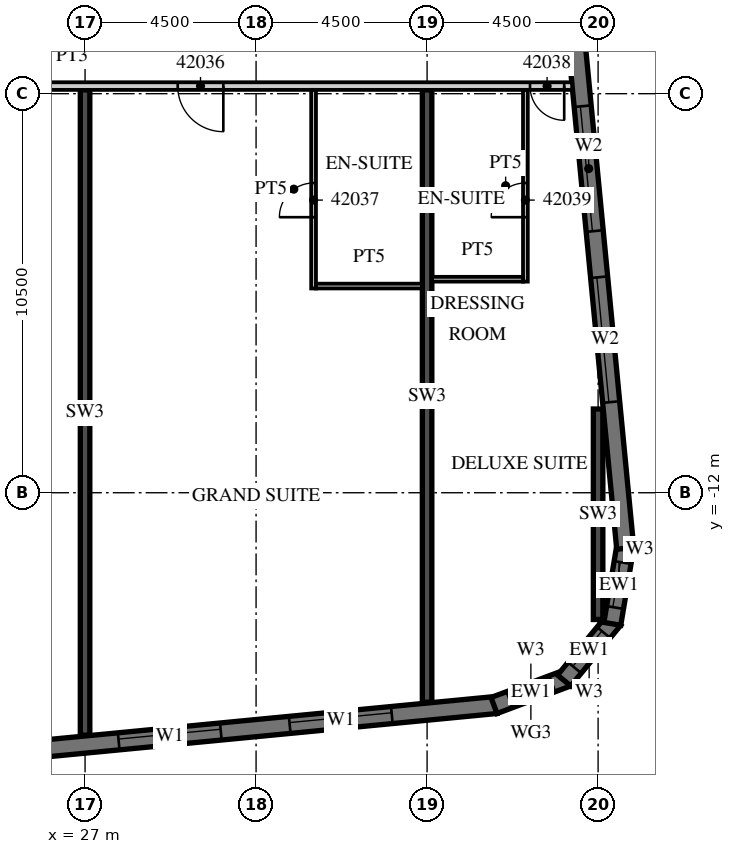
"""IFC4 building model, lengths in metres.
Left out: names, types, materials, properties, quantities, classifications, styles, units other than length and angle.
Written with IfcOpenShell. Run it as: python <this file> out.ifc"""

import sys

from ifc_helpers import new_model, si_unit, direction, frame, frame_2d, origin, place, context, subcontext, project, spatial, polyline, rectangle, outline, extrude, element, fill, save


model = new_model("IFC4")
c1 = context("Model", 3, precision=1e-05, world=origin(), true_north=direction((0.0, 1.0)))
c2 = subcontext(c1, "Body", "Model", "MODEL_VIEW")
j1 = project(units=[si_unit("LENGTHUNIT", "METRE"), si_unit("PLANEANGLEUNIT", "RADIAN")], contexts=[c1])
p1 = place(None, origin())
s1 = spatial("IfcSite", under=j1, at=p1, CompositionType="ELEMENT")
p2 = place(p1, origin())
s2 = spatial("IfcBuilding", under=s1, at=p2, CompositionType="ELEMENT")
p3 = place(p2, frame((0.0, 0.0, 180.1)))
s3 = spatial("IfcBuildingStorey", under=s2, at=p3, CompositionType="ELEMENT", Elevation=180.1)
p4 = place(p3, frame((27.0, -18.379, 0.0), z_axis=(0.0, 0.0, 1.0), x_axis=(0.0, 1.0, 0.0)))
e1 = element("IfcWall", 1, at=p4, inside=s3, PredefinedType="SHEAR", context=c2, shape_type="SweptSolid", body=[
    extrude(rectangle(XDim=16.979, YDim=0.25, at=frame_2d((8.489, 0.0))), origin(), (0.0, 0.0, 1.0), 3.3),
])
p5 = place(p3, frame((36.0, -17.512, 0.0), z_axis=(0.0, 0.0, 1.0), x_axis=(0.0, 1.0, 0.0)))
e2 = element("IfcWall", 2, at=p5, inside=s3, PredefinedType="SHEAR", context=c2, shape_type="SweptSolid", body=[
    extrude(rectangle(XDim=16.112, YDim=0.25, at=frame_2d((8.056, 0.0))), origin(), (0.0, 0.0, 1.0), 3.3),
])
p6 = place(p3, frame((40.5, -15.335, 0.0), z_axis=(0.0, 0.0, 1.0), x_axis=(0.0, 1.0, 0.0)))
e3 = element("IfcWall", 3, at=p6, inside=s3, PredefinedType="SHEAR", context=c2, shape_type="SweptSolid", body=[
    extrude(rectangle(XDim=5.538, YDim=0.25, at=frame_2d((2.769, 0.0))), origin(), (0.0, 0.0, 1.0), 3.3),
])
p7 = place(p3, frame((-13.521, -22.529, 0.0), z_axis=(0.0, 0.0, 1.0), x_axis=(0.995396436651, 0.095843277819, 0.0)))
e4 = element("IfcWall", 4, at=p7, inside=s3, PredefinedType="SOLIDWALL", context=c2, shape_type="SweptSolid", body=[
    extrude(rectangle(XDim=51.578, YDim=0.45, at=frame_2d((25.789, 0.0))), origin(), (0.0, 0.0, 1.0), 3.02),
])
p8 = place(p7, frame((0.91, 0.0, 0.45)))
e5 = element("IfcOpeningElement", 5, at=p8, cuts=e4, PredefinedType="OPENING", context=c2, shape_type="SweptSolid", body=[
    extrude(rectangle(XDim=2.7, YDim=2.25, at=frame_2d((1.35, 1.125))), frame((0.0, 0.235, 0.0), z_axis=(0.0, -1.0, 0.0), x_axis=(1.0, 0.0, 0.0)), (0.0, 0.0, 1.0), 0.47),
])
p9 = place(p7, frame((5.431, 0.0, 0.45)))
e6 = element("IfcOpeningElement", 6, at=p9, cuts=e4, PredefinedType="OPENING", context=c2, shape_type="SweptSolid", body=[
    extrude(rectangle(XDim=2.7, YDim=2.25, at=frame_2d((1.35, 1.125))), frame((0.0, 0.235, 0.0), z_axis=(0.0, -1.0, 0.0), x_axis=(1.0, 0.0, 0.0)), (0.0, 0.0, 1.0), 0.47),
])
p10 = place(p7, frame((9.952, 0.0, 0.45)))
e7 = element("IfcOpeningElement", 7, at=p10, cuts=e4, PredefinedType="OPENING", context=c2, shape_type="SweptSolid", body=[
    extrude(rectangle(XDim=2.7, YDim=2.25, at=frame_2d((1.35, 1.125))), frame((0.0, 0.235, 0.0), z_axis=(0.0, -1.0, 0.0), x_axis=(1.0, 0.0, 0.0)), (0.0, 0.0, 1.0), 0.47),
])
p11 = place(p7, frame((14.473, 0.0, 0.45)))
e8 = element("IfcOpeningElement", 8, at=p11, cuts=e4, PredefinedType="OPENING", context=c2, shape_type="SweptSolid", body=[
    extrude(rectangle(XDim=2.7, YDim=2.25, at=frame_2d((1.35, 1.125))), frame((0.0, 0.235, 0.0), z_axis=(0.0, -1.0, 0.0), x_axis=(1.0, 0.0, 0.0)), (0.0, 0.0, 1.0), 0.47),
])
p12 = place(p7, frame((18.994, 0.0, 0.45)))
e9 = element("IfcOpeningElement", 9, at=p12, cuts=e4, PredefinedType="OPENING", context=c2, shape_type="SweptSolid", body=[
    extrude(rectangle(XDim=2.7, YDim=2.25, at=frame_2d((1.35, 1.125))), frame((0.0, 0.235, 0.0), z_axis=(0.0, -1.0, 0.0), x_axis=(1.0, 0.0, 0.0)), (0.0, 0.0, 1.0), 0.47),
])
p13 = place(p7, frame((23.514, 0.0, 0.45)))
e10 = element("IfcOpeningElement", 10, at=p13, cuts=e4, PredefinedType="OPENING", context=c2, shape_type="SweptSolid", body=[
    extrude(rectangle(XDim=2.7, YDim=2.25, at=frame_2d((1.35, 1.125))), frame((0.0, 0.235, 0.0), z_axis=(0.0, -1.0, 0.0), x_axis=(1.0, 0.0, 0.0)), (0.0, 0.0, 1.0), 0.47),
])
p14 = place(p7, frame((28.035, 0.0, 0.45)))
e11 = element("IfcOpeningElement", 11, at=p14, cuts=e4, PredefinedType="OPENING", context=c2, shape_type="SweptSolid", body=[
    extrude(rectangle(XDim=2.7, YDim=2.25, at=frame_2d((1.35, 1.125))), frame((0.0, 0.235, 0.0), z_axis=(0.0, -1.0, 0.0), x_axis=(1.0, 0.0, 0.0)), (0.0, 0.0, 1.0), 0.47),
])
p15 = place(p7, frame((32.556, 0.0, 0.45)))
e12 = element("IfcOpeningElement", 12, at=p15, cuts=e4, PredefinedType="OPENING", context=c2, shape_type="SweptSolid", body=[
    extrude(rectangle(XDim=2.7, YDim=2.25, at=frame_2d((1.35, 1.125))), frame((0.0, 0.235, 0.0), z_axis=(0.0, -1.0, 0.0), x_axis=(1.0, 0.0, 0.0)), (0.0, 0.0, 1.0), 0.47),
])
p16 = place(p7, frame((37.077, 0.0, 0.45)))
e13 = element("IfcOpeningElement", 13, at=p16, cuts=e4, PredefinedType="OPENING", context=c2, shape_type="SweptSolid", body=[
    extrude(rectangle(XDim=2.7, YDim=2.25, at=frame_2d((1.35, 1.125))), frame((0.0, 0.235, 0.0), z_axis=(0.0, -1.0, 0.0), x_axis=(1.0, 0.0, 0.0)), (0.0, 0.0, 1.0), 0.47),
])
p17 = place(p7, frame((41.598, 0.0, 0.45)))
e14 = element("IfcOpeningElement", 14, at=p17, cuts=e4, PredefinedType="OPENING", context=c2, shape_type="SweptSolid", body=[
    extrude(rectangle(XDim=2.7, YDim=2.25, at=frame_2d((1.35, 1.125))), frame((0.0, 0.235, 0.0), z_axis=(0.0, -1.0, 0.0), x_axis=(1.0, 0.0, 0.0)), (0.0, 0.0, 1.0), 0.47),
])
p18 = place(p7, frame((46.119, 0.0, 0.45)))
e15 = element("IfcOpeningElement", 15, at=p18, cuts=e4, PredefinedType="OPENING", context=c2, shape_type="SweptSolid", body=[
    extrude(rectangle(XDim=2.7, YDim=2.25, at=frame_2d((1.35, 1.125))), frame((0.0, 0.235, 0.0), z_axis=(0.0, -1.0, 0.0), x_axis=(1.0, 0.0, 0.0)), (0.0, 0.0, 1.0), 0.47),
])
p19 = place(p3, frame((37.761, -17.598, 0.0), z_axis=(0.0, 0.0, 1.0), x_axis=(0.936677599948, 0.350192909346, 0.0)))
e16 = element("IfcWall", 16, at=p19, inside=s3, PredefinedType="SOLIDWALL", context=c2, shape_type="SweptSolid", body=[
    extrude(outline(polyline([(0.0, -0.225), (2.071, -0.225), (1.95, 0.225), (0.121, 0.225), (0.0, -0.225)])), origin(), (0.0, 0.0, 1.0), 3.02),
])
p20 = place(p19, frame((0.435, 0.0, 0.45)))
e17 = element("IfcOpeningElement", 17, at=p20, cuts=e16, PredefinedType="OPENING", context=c2, shape_type="SweptSolid", body=[
    extrude(rectangle(XDim=1.2, YDim=2.25, at=frame_2d((0.6, 1.125))), frame((0.0, 0.235, 0.0), z_axis=(0.0, -1.0, 0.0), x_axis=(1.0, 0.0, 0.0)), (0.0, 0.0, 1.0), 0.47),
])
p21 = place(p3, frame((39.606, -16.941, 0.0), z_axis=(0.0, 0.0, 1.0), x_axis=(0.636116318187, 0.771593176315, 0.0)))
e18 = element("IfcWall", 18, at=p21, inside=s3, PredefinedType="SOLIDWALL", context=c2, shape_type="SweptSolid", body=[
    extrude(outline(polyline([(0.0, -0.225), (2.071, -0.225), (1.95, 0.225), (0.121, 0.225), (0.0, -0.225)])), origin(), (0.0, 0.0, 1.0), 3.02),
])
p22 = place(p21, frame((0.435, 0.0, 0.45)))
e19 = element("IfcOpeningElement", 19, at=p22, cuts=e18, PredefinedType="OPENING", context=c2, shape_type="SweptSolid", body=[
    extrude(rectangle(XDim=1.2, YDim=2.25, at=frame_2d((0.6, 1.125))), frame((0.0, 0.235, 0.0), z_axis=(0.0, -1.0, 0.0), x_axis=(1.0, 0.0, 0.0)), (0.0, 0.0, 1.0), 0.47),
])
p23 = place(p3, frame((40.875, -15.449, 0.0), z_axis=(0.0, 0.0, 1.0), x_axis=(0.164953448126, 0.986301353518, 0.0)))
e20 = element("IfcWall", 20, at=p23, inside=s3, PredefinedType="SOLIDWALL", context=c2, shape_type="SweptSolid", body=[
    extrude(outline(polyline([(0.0, -0.225), (2.071, -0.225), (1.95, 0.225), (0.121, 0.225), (0.0, -0.225)])), origin(), (0.0, 0.0, 1.0), 3.02),
])
p24 = place(p23, frame((0.435, 0.0, 0.45)))
e21 = element("IfcOpeningElement", 21, at=p24, cuts=e20, PredefinedType="OPENING", context=c2, shape_type="SweptSolid", body=[
    extrude(rectangle(XDim=1.2, YDim=2.25, at=frame_2d((0.6, 1.125))), frame((0.0, 0.235, 0.0), z_axis=(0.0, -1.0, 0.0), x_axis=(1.0, 0.0, 0.0)), (0.0, 0.0, 1.0), 0.47),
])
p25 = place(p3, frame((41.214, -13.466, 0.0), z_axis=(0.0, 0.0, 1.0), x_axis=(-0.095847314626, 0.995396047952, 0.0)))
e22 = element("IfcWall", 22, at=p25, inside=s3, PredefinedType="SOLIDWALL", context=c2, shape_type="SweptSolid", body=[
    extrude(rectangle(XDim=34.0, YDim=0.45, at=frame_2d((17.0, 0.0))), origin(), (0.0, 0.0, 1.0), 3.02),
])
p26 = place(p25, frame((3.869, 0.0, 0.45)))
e23 = element("IfcOpeningElement", 23, at=p26, cuts=e22, PredefinedType="OPENING", context=c2, shape_type="SweptSolid", body=[
    extrude(rectangle(XDim=3.3, YDim=2.25, at=frame_2d((1.65, 1.125))), frame((0.0, 0.235, 0.0), z_axis=(0.0, -1.0, 0.0), x_axis=(1.0, 0.0, 0.0)), (0.0, 0.0, 1.0), 0.47),
])
p27 = place(p25, frame((8.39, 0.0, 0.45)))
e24 = element("IfcOpeningElement", 24, at=p27, cuts=e22, PredefinedType="OPENING", context=c2, shape_type="SweptSolid", body=[
    extrude(rectangle(XDim=3.3, YDim=2.25, at=frame_2d((1.65, 1.125))), frame((0.0, 0.235, 0.0), z_axis=(0.0, -1.0, 0.0), x_axis=(1.0, 0.0, 0.0)), (0.0, 0.0, 1.0), 0.47),
])
p28 = place(p3, frame((13.5, -1.3, 0.0), z_axis=(0.0, 0.0, 1.0), x_axis=(1.0, 0.0, 0.0)))
e25 = element("IfcWall", 25, at=p28, inside=s3, PredefinedType="PARTITIONING", context=c2, shape_type="SweptSolid", body=[
    extrude(rectangle(XDim=26.317, YDim=0.2, at=frame_2d((13.158, 0.0))), origin(), (0.0, 0.0, 1.0), 3.02),
])
p29 = place(p28, frame((2.925, 0.0, 0.0)))
e26 = element("IfcOpeningElement", 26, at=p29, cuts=e25, PredefinedType="OPENING", context=c2, shape_type="SweptSolid", body=[
    extrude(rectangle(XDim=1.0, YDim=2.1, at=frame_2d((0.5, 1.05))), frame((0.0, 0.11, 0.0), z_axis=(0.0, -1.0, 0.0), x_axis=(1.0, 0.0, 0.0)), (0.0, 0.0, 1.0), 0.22),
])
p30 = place(p28, frame((9.862, 0.0, 0.0)))
e27 = element("IfcOpeningElement", 27, at=p30, cuts=e25, PredefinedType="OPENING", context=c2, shape_type="SweptSolid", body=[
    extrude(rectangle(XDim=1.2, YDim=2.1, at=frame_2d((0.6, 1.05))), frame((0.0, 0.11, 0.0), z_axis=(0.0, -1.0, 0.0), x_axis=(1.0, 0.0, 0.0)), (0.0, 0.0, 1.0), 0.22),
])
p31 = place(p28, frame((15.938, 0.0, 0.0)))
e28 = element("IfcOpeningElement", 28, at=p31, cuts=e25, PredefinedType="OPENING", context=c2, shape_type="SweptSolid", body=[
    extrude(rectangle(XDim=1.2, YDim=2.1, at=frame_2d((0.6, 1.05))), frame((0.0, 0.11, 0.0), z_axis=(0.0, -1.0, 0.0), x_axis=(1.0, 0.0, 0.0)), (0.0, 0.0, 1.0), 0.22),
])
p32 = place(p28, frame((25.208, 0.0, 0.0)))
e29 = element("IfcOpeningElement", 29, at=p32, cuts=e25, PredefinedType="OPENING", context=c2, shape_type="SweptSolid", body=[
    extrude(rectangle(XDim=0.9, YDim=2.1, at=frame_2d((0.45, 1.05))), frame((0.0, 0.11, 0.0), z_axis=(0.0, -1.0, 0.0), x_axis=(1.0, 0.0, 0.0)), (0.0, 0.0, 1.0), 0.22),
])
p33 = place(p3, frame((33.013, -6.625, 0.0), z_axis=(0.0, 0.0, 1.0), x_axis=(0.0, 1.0, 0.0)))
e30 = element("IfcWall", 30, at=p33, inside=s3, PredefinedType="PARTITIONING", context=c2, shape_type="SweptSolid", body=[
    extrude(rectangle(XDim=5.225, YDim=0.125, at=frame_2d((2.613, 0.0))), origin(), (0.0, 0.0, 1.0), 3.02),
])
p34 = place(p33, frame((1.875, 0.0, 0.0)))
e31 = element("IfcOpeningElement", 31, at=p34, cuts=e30, PredefinedType="OPENING", context=c2, shape_type="SweptSolid", body=[
    extrude(rectangle(XDim=0.9, YDim=2.1, at=frame_2d((0.45, 1.05))), frame((0.0, 0.073, 0.0), z_axis=(0.0, -1.0, 0.0), x_axis=(1.0, 0.0, 0.0)), (0.0, 0.0, 1.0), 0.145),
])
p35 = place(p3, frame((33.075, -6.562, 0.0), z_axis=(0.0, 0.0, 1.0), x_axis=(1.0, 0.0, 0.0)))
e32 = element("IfcWall", 32, at=p35, inside=s3, PredefinedType="PARTITIONING", context=c2, shape_type="SweptSolid", body=[
    extrude(rectangle(XDim=2.8, YDim=0.125, at=frame_2d((1.4, 0.0))), origin(), (0.0, 0.0, 1.0), 3.02),
])
p36 = place(p3, frame((38.587, -6.445, 0.0), z_axis=(0.0, 0.0, 1.0), x_axis=(0.0, 1.0, 0.0)))
e33 = element("IfcWall", 33, at=p36, inside=s3, PredefinedType="PARTITIONING", context=c2, shape_type="SweptSolid", body=[
    extrude(rectangle(XDim=5.045, YDim=0.125, at=frame_2d((2.522, 0.0))), origin(), (0.0, 0.0, 1.0), 3.02),
])
p37 = place(p36, frame((1.695, 0.0, 0.0)))
e34 = element("IfcOpeningElement", 34, at=p37, cuts=e33, PredefinedType="OPENING", context=c2, shape_type="SweptSolid", body=[
    extrude(rectangle(XDim=0.9, YDim=2.1, at=frame_2d((0.45, 1.05))), frame((0.0, 0.073, 0.0), z_axis=(0.0, -1.0, 0.0), x_axis=(1.0, 0.0, 0.0)), (0.0, 0.0, 1.0), 0.145),
])
p38 = place(p3, frame((36.125, -6.382, 0.0), z_axis=(0.0, 0.0, 1.0), x_axis=(1.0, 0.0, 0.0)))
e35 = element("IfcWall", 35, at=p38, inside=s3, PredefinedType="PARTITIONING", context=c2, shape_type="SweptSolid", body=[
    extrude(rectangle(XDim=2.4, YDim=0.125, at=frame_2d((1.2, 0.0))), origin(), (0.0, 0.0, 1.0), 3.02),
])
p39 = place(p17, origin())
e36 = element("IfcWindow", 36, at=p39, inside=s3, PartitioningType="SINGLE_PANEL", PredefinedType="WINDOW", context=c2, shape_type="SweptSolid", body=[
    extrude(rectangle(XDim=2.7, YDim=2.25, at=frame_2d((1.35, 1.125))), frame((0.0, 0.09, 0.0), z_axis=(0.0, -1.0, 0.0), x_axis=(1.0, 0.0, 0.0)), (0.0, 0.0, 1.0), 0.06),
])
fill(e14, e36)
p40 = place(p18, origin())
e37 = element("IfcWindow", 37, at=p40, inside=s3, PartitioningType="SINGLE_PANEL", PredefinedType="WINDOW", context=c2, shape_type="SweptSolid", body=[
    extrude(rectangle(XDim=2.7, YDim=2.25, at=frame_2d((1.35, 1.125))), frame((0.0, 0.09, 0.0), z_axis=(0.0, -1.0, 0.0), x_axis=(1.0, 0.0, 0.0)), (0.0, 0.0, 1.0), 0.06),
])
fill(e15, e37)
p41 = place(p20, origin())
e38 = element("IfcWindow", 38, at=p41, inside=s3, PartitioningType="SINGLE_PANEL", PredefinedType="WINDOW", context=c2, shape_type="SweptSolid", body=[
    extrude(rectangle(XDim=1.2, YDim=2.25, at=frame_2d((0.6, 1.125))), frame((0.0, 0.09, 0.0), z_axis=(0.0, -1.0, 0.0), x_axis=(1.0, 0.0, 0.0)), (0.0, 0.0, 1.0), 0.06),
])
fill(e17, e38)
p42 = place(p22, origin())
e39 = element("IfcWindow", 39, at=p42, inside=s3, PartitioningType="SINGLE_PANEL", PredefinedType="WINDOW", context=c2, shape_type="SweptSolid", body=[
    extrude(rectangle(XDim=1.2, YDim=2.25, at=frame_2d((0.6, 1.125))), frame((0.0, 0.09, 0.0), z_axis=(0.0, -1.0, 0.0), x_axis=(1.0, 0.0, 0.0)), (0.0, 0.0, 1.0), 0.06),
])
fill(e19, e39)
p43 = place(p24, origin())
e40 = element("IfcWindow", 40, at=p43, inside=s3, PartitioningType="SINGLE_PANEL", PredefinedType="WINDOW", context=c2, shape_type="SweptSolid", body=[
    extrude(rectangle(XDim=1.2, YDim=2.25, at=frame_2d((0.6, 1.125))), frame((0.0, 0.09, 0.0), z_axis=(0.0, -1.0, 0.0), x_axis=(1.0, 0.0, 0.0)), (0.0, 0.0, 1.0), 0.06),
])
fill(e21, e40)
p44 = place(p26, origin())
e41 = element("IfcWindow", 41, at=p44, inside=s3, PartitioningType="SINGLE_PANEL", PredefinedType="WINDOW", context=c2, shape_type="SweptSolid", body=[
    extrude(rectangle(XDim=3.3, YDim=2.25, at=frame_2d((1.65, 1.125))), frame((0.0, 0.09, 0.0), z_axis=(0.0, -1.0, 0.0), x_axis=(1.0, 0.0, 0.0)), (0.0, 0.0, 1.0), 0.06),
])
fill(e23, e41)
p45 = place(p27, origin())
e42 = element("IfcWindow", 42, at=p45, inside=s3, PartitioningType="SINGLE_PANEL", PredefinedType="WINDOW", context=c2, shape_type="SweptSolid", body=[
    extrude(rectangle(XDim=3.3, YDim=2.25, at=frame_2d((1.65, 1.125))), frame((0.0, 0.09, 0.0), z_axis=(0.0, -1.0, 0.0), x_axis=(1.0, 0.0, 0.0)), (0.0, 0.0, 1.0), 0.06),
])
fill(e24, e42)
p46 = place(p31, origin())
e43 = element("IfcDoor", 43, at=p46, inside=s3, OperationType="SINGLE_SWING_RIGHT", PredefinedType="DOOR", context=c2, shape_type="SweptSolid", body=[
    extrude(rectangle(XDim=1.2, YDim=2.1, at=frame_2d((0.6, 1.05))), frame((0.0, 0.025, 0.0), z_axis=(0.0, -1.0, 0.0), x_axis=(1.0, 0.0, 0.0)), (0.0, 0.0, 1.0), 0.05),
])
fill(e28, e43)
p47 = place(p34, origin())
e44 = element("IfcDoor", 44, at=p47, inside=s3, OperationType="SINGLE_SWING_LEFT", PredefinedType="DOOR", context=c2, shape_type="SweptSolid", body=[
    extrude(rectangle(XDim=0.9, YDim=2.1, at=frame_2d((0.45, 1.05))), frame((0.0, 0.025, 0.0), z_axis=(0.0, -1.0, 0.0), x_axis=(1.0, 0.0, 0.0)), (0.0, 0.0, 1.0), 0.05),
])
fill(e31, e44)
p48 = place(p32, origin())
e45 = element("IfcDoor", 45, at=p48, inside=s3, OperationType="SINGLE_SWING_RIGHT", PredefinedType="DOOR", context=c2, shape_type="SweptSolid", body=[
    extrude(rectangle(XDim=0.9, YDim=2.1, at=frame_2d((0.45, 1.05))), frame((0.0, 0.025, 0.0), z_axis=(0.0, -1.0, 0.0), x_axis=(1.0, 0.0, 0.0)), (0.0, 0.0, 1.0), 0.05),
])
fill(e29, e45)
p49 = place(p37, origin())
e46 = element("IfcDoor", 46, at=p49, inside=s3, OperationType="SINGLE_SWING_LEFT", PredefinedType="DOOR", context=c2, shape_type="SweptSolid", body=[
    extrude(rectangle(XDim=0.9, YDim=2.1, at=frame_2d((0.45, 1.05))), frame((0.0, 0.025, 0.0), z_axis=(0.0, -1.0, 0.0), x_axis=(1.0, 0.0, 0.0)), (0.0, 0.0, 1.0), 0.05),
])
fill(e34, e46)
save(model, sys.argv[1])
